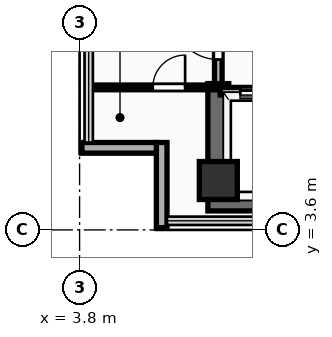
"""IFC4 building model, lengths in metres.
Left out: names, types, materials, properties, quantities, classifications, styles, units other than length and angle.
Written with IfcOpenShell. Run it as: python <this file> out.ifc"""

import sys

from ifc_helpers import new_model, si_unit, direction, frame, frame_2d, origin, origin_2d, place, context, subcontext, project, spatial, rectangle, extrude, element, fill, save


model = new_model("IFC4")
c1 = context("Model", 3, precision=1e-05, world=origin(), true_north=direction((0.0, 1.0)))
c2 = subcontext(c1, "Body", "Model", "MODEL_VIEW")
j1 = project(units=[si_unit("LENGTHUNIT", "METRE"), si_unit("PLANEANGLEUNIT", "RADIAN")], contexts=[c1])
p1 = place(None, origin())
s1 = spatial("IfcSite", under=j1, at=p1, CompositionType="ELEMENT")
p2 = place(p1, origin())
s2 = spatial("IfcBuilding", under=s1, at=p2, CompositionType="ELEMENT")
p3 = place(p2, frame((0.0, 0.0, 208.3)))
s3 = spatial("IfcBuildingStorey", under=s2, at=p3, CompositionType="ELEMENT", Elevation=208.3)
p4 = place(p3, frame((7.175, 4.375, 0.0), z_axis=(0.0, 0.0, 1.0), x_axis=(1.0, 0.0, 0.0)))
e1 = element("IfcWall", 1, at=p4, inside=s3, PredefinedType="SHEAR", context=c2, shape_type="SweptSolid", body=[
    extrude(rectangle(XDim=13.9, YDim=0.55, at=frame_2d((6.95, 0.0))), origin(), (0.0, 0.0, 1.0), 3.56),
])
p5 = place(p3, frame((7.45, 4.65, 0.0), z_axis=(0.0, 0.0, 1.0), x_axis=(0.0, 1.0, 0.0)))
e2 = element("IfcWall", 2, at=p5, inside=s3, PredefinedType="SHEAR", context=c2, shape_type="SweptSolid", body=[
    extrude(rectangle(XDim=2.8, YDim=0.55, at=frame_2d((1.4, 0.0))), origin(), (0.0, 0.0, 1.0), 3.56),
])
p6 = place(p3, frame((7.45, 4.9, 0.0), z_axis=(0.0, 0.0, 1.0), x_axis=(1.0, 0.0, 0.0)))
e3 = element("IfcColumn", 3, at=p6, inside=s3, PredefinedType="COLUMN", context=c2, shape_type="SweptSolid", body=[
    extrude(rectangle(XDim=1.0, YDim=1.0, at=origin_2d()), origin(), (0.0, 0.0, 1.0), 3.56),
])
p7 = place(p3, frame((5.96, 3.66, 0.0), z_axis=(0.0, 0.0, 1.0), x_axis=(0.0, 1.0, 0.0)))
e4 = element("IfcWall", 4, at=p7, inside=s3, PredefinedType="SOLIDWALL", context=c2, shape_type="SweptSolid", body=[
    extrude(rectangle(XDim=2.24, YDim=0.28, at=frame_2d((1.12, 0.0))), origin(), (0.0, 0.0, 1.0), 3.56),
])
p8 = place(p3, frame((3.86, 5.76, 0.0), z_axis=(0.0, 0.0, 1.0), x_axis=(1.0, 0.0, 0.0)))
e5 = element("IfcWall", 5, at=p8, inside=s3, PredefinedType="SOLIDWALL", context=c2, shape_type="SweptSolid", body=[
    extrude(rectangle(XDim=1.96, YDim=0.28, at=frame_2d((0.98, 0.0))), origin(), (0.0, 0.0, 1.0), 3.56),
])
p9 = place(p3, frame((7.5, 7.25, 0.0), z_axis=(0.0, 0.0, 1.0), x_axis=(1.0, 0.0, 0.0)))
e6 = element("IfcWall", 6, at=p9, inside=s3, PredefinedType="PARTITIONING", context=c2, shape_type="SweptSolid", body=[
    extrude(rectangle(XDim=8.35, YDim=0.2, at=frame_2d((4.175, 0.0))), origin(), (0.0, 0.0, 1.0), 3.56),
])
p10 = place(p9, frame((0.53, 0.0, 0.0)))
e7 = element("IfcOpeningElement", 7, at=p10, cuts=e6, PredefinedType="OPENING", context=c2, shape_type="SweptSolid", body=[
    extrude(rectangle(XDim=1.1, YDim=2.2, at=frame_2d((0.55, 1.1))), frame((0.0, 0.11, 0.0), z_axis=(0.0, -1.0, 0.0), x_axis=(1.0, 0.0, 0.0)), (0.0, 0.0, 1.0), 0.22),
])
p11 = place(p9, frame((2.37, 0.0, 0.0)))
e8 = element("IfcOpeningElement", 8, at=p11, cuts=e6, PredefinedType="OPENING", context=c2, shape_type="SweptSolid", body=[
    extrude(rectangle(XDim=1.1, YDim=2.2, at=frame_2d((0.55, 1.1))), frame((0.0, 0.11, 0.0), z_axis=(0.0, -1.0, 0.0), x_axis=(1.0, 0.0, 0.0)), (0.0, 0.0, 1.0), 0.22),
])
p12 = place(p9, frame((4.33, 0.0, 0.0)))
e9 = element("IfcOpeningElement", 9, at=p12, cuts=e6, PredefinedType="OPENING", context=c2, shape_type="SweptSolid", body=[
    extrude(rectangle(XDim=1.1, YDim=2.2, at=frame_2d((0.55, 1.1))), frame((0.0, 0.11, 0.0), z_axis=(0.0, -1.0, 0.0), x_axis=(1.0, 0.0, 0.0)), (0.0, 0.0, 1.0), 0.22),
])
p13 = place(p9, frame((6.5, 0.0, 0.0)))
e10 = element("IfcOpeningElement", 10, at=p13, cuts=e6, PredefinedType="OPENING", context=c2, shape_type="SweptSolid", body=[
    extrude(rectangle(XDim=1.1, YDim=2.2, at=frame_2d((0.55, 1.1))), frame((0.0, 0.11, 0.0), z_axis=(0.0, -1.0, 0.0), x_axis=(1.0, 0.0, 0.0)), (0.0, 0.0, 1.0), 0.22),
])
p14 = place(p3, frame((7.45, 7.45, 0.0), z_axis=(0.0, 0.0, 1.0), x_axis=(0.0, 1.0, 0.0)))
e11 = element("IfcWall", 11, at=p14, inside=s3, PredefinedType="PARTITIONING", context=c2, shape_type="SweptSolid", body=[
    extrude(rectangle(XDim=2.3, YDim=0.2, at=frame_2d((1.15, 0.0))), origin(), (0.0, 0.0, 1.0), 2.54),
])
p15 = place(p14, frame((0.633, 0.0, 0.0)))
e12 = element("IfcOpeningElement", 12, at=p15, cuts=e11, PredefinedType="OPENING", context=c2, shape_type="SweptSolid", body=[
    extrude(rectangle(XDim=1.2, YDim=2.25, at=frame_2d((0.6, 1.125))), frame((0.0, 0.11, 0.0), z_axis=(0.0, -1.0, 0.0), x_axis=(1.0, 0.0, 0.0)), (0.0, 0.0, 1.0), 0.22),
])
p16 = place(p3, frame((4.04, 7.35, 0.0), z_axis=(0.0, 0.0, 1.0), x_axis=(1.0, 0.0, 0.0)))
e13 = element("IfcWall", 13, at=p16, inside=s3, PredefinedType="PARTITIONING", context=c2, shape_type="SweptSolid", body=[
    extrude(rectangle(XDim=3.36, YDim=0.125, at=frame_2d((1.68, 0.0))), origin(), (0.0, 0.0, 1.0), 3.56),
])
p17 = place(p16, frame((1.687, 0.0, 0.0)))
e14 = element("IfcOpeningElement", 14, at=p17, cuts=e13, PredefinedType="OPENING", context=c2, shape_type="SweptSolid", body=[
    extrude(rectangle(XDim=0.85, YDim=2.15, at=frame_2d((0.425, 1.075))), frame((0.0, 0.073, 0.0), z_axis=(0.0, -1.0, 0.0), x_axis=(1.0, 0.0, 0.0)), (0.0, 0.0, 1.0), 0.145),
])
p18 = place(p10, origin())
e15 = element("IfcDoor", 15, at=p18, inside=s3, OperationType="SLIDING_TO_LEFT", PredefinedType="DOOR", context=c2, shape_type="SweptSolid", body=[
    extrude(rectangle(XDim=1.1, YDim=2.2, at=frame_2d((0.55, 1.1))), frame((0.0, 0.025, 0.0), z_axis=(0.0, -1.0, 0.0), x_axis=(1.0, 0.0, 0.0)), (0.0, 0.0, 1.0), 0.05),
])
fill(e7, e15)
p19 = place(p15, frame((1.2, 0.0, 0.0), z_axis=(0.0, 0.0, 1.0), x_axis=(-1.0, 0.0, 0.0)))
e16 = element("IfcDoor", 16, at=p19, inside=s3, OperationType="SINGLE_SWING_LEFT", PredefinedType="DOOR", context=c2, shape_type="SweptSolid", body=[
    extrude(rectangle(XDim=1.2, YDim=2.25, at=frame_2d((0.6, 1.125))), frame((0.0, 0.025, 0.0), z_axis=(0.0, -1.0, 0.0), x_axis=(1.0, 0.0, 0.0)), (0.0, 0.0, 1.0), 0.05),
])
fill(e12, e16)
p20 = place(p17, origin())
e17 = element("IfcDoor", 17, at=p20, inside=s3, OperationType="SINGLE_SWING_RIGHT", PredefinedType="DOOR", context=c2, shape_type="SweptSolid", body=[
    extrude(rectangle(XDim=0.85, YDim=2.15, at=frame_2d((0.425, 1.075))), frame((0.0, 0.025, 0.0), z_axis=(0.0, -1.0, 0.0), x_axis=(1.0, 0.0, 0.0)), (0.0, 0.0, 1.0), 0.05),
])
fill(e14, e17)
save(model, sys.argv[1])
